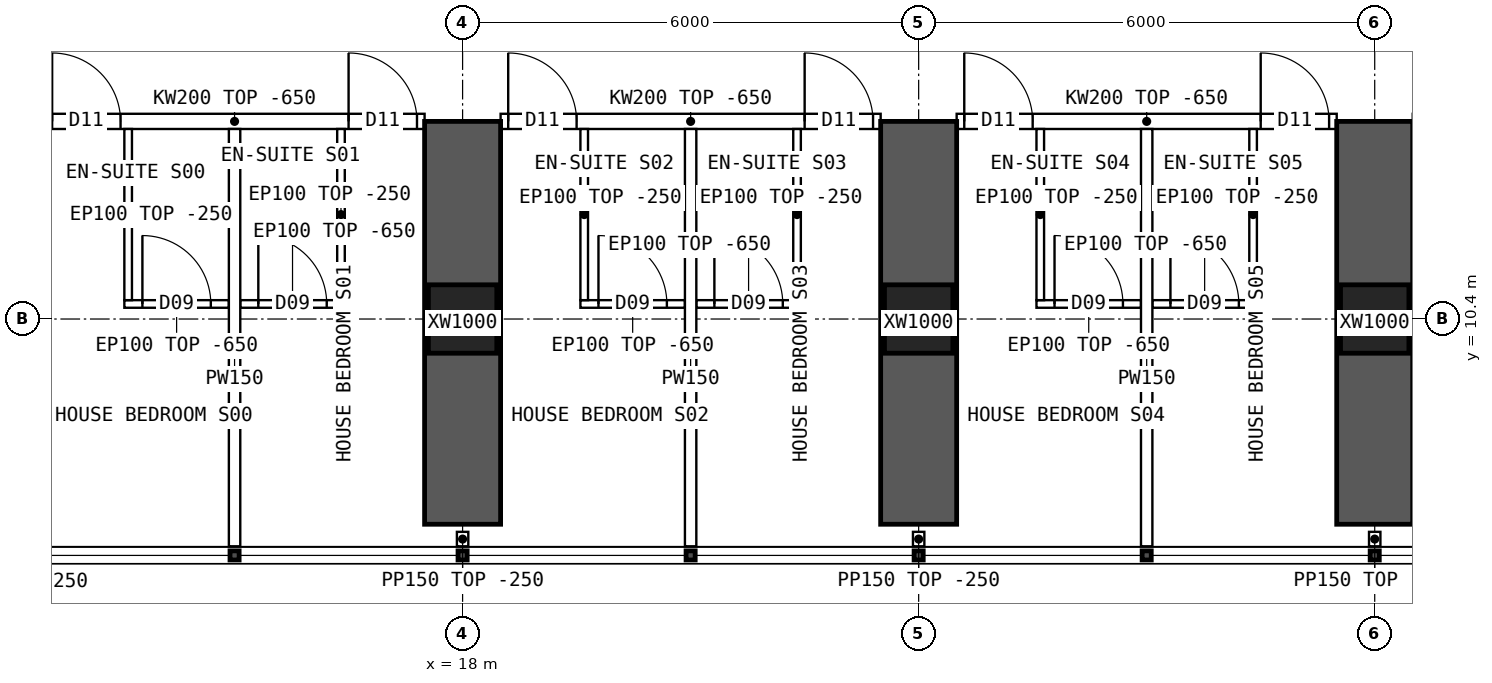
"""IFC4 building model, lengths in metres.
Left out: names, types, materials, properties, quantities, classifications, styles, units other than length and angle.
Written with IfcOpenShell. Run it as: python <this file> out.ifc"""

import sys

from ifc_helpers import new_model, si_unit, direction, frame, frame_2d, origin, origin_2d, place, context, subcontext, project, spatial, polyline, rectangle, hollow_rectangle, outline, extrude, element, fill, save


model = new_model("IFC4")
c1 = context("Model", 3, precision=1e-05, world=origin(), true_north=direction((0.0, 1.0)))
c2 = subcontext(c1, "Body", "Model", "MODEL_VIEW")
j1 = project(units=[si_unit("LENGTHUNIT", "METRE"), si_unit("PLANEANGLEUNIT", "RADIAN")], contexts=[c1])
p1 = place(None, origin())
s1 = spatial("IfcSite", under=j1, at=p1, CompositionType="ELEMENT")
p2 = place(p1, origin())
s2 = spatial("IfcBuilding", under=s1, at=p2, CompositionType="ELEMENT")
p3 = place(p2, frame((0.0, 0.0, 31.45)))
s3 = spatial("IfcBuildingStorey", under=s2, at=p3, CompositionType="ELEMENT", Elevation=31.45)
for number, where, z_axis, x_axis in (
    (1, (18.0, 10.4, 0.0), (0.0, 0.0, 1.0), (1.0, 0.0, 0.0)),
    (2, (24.0, 10.4, 0.0), (0.0, 0.0, 1.0), (1.0, 0.0, 0.0)),
    (3, (30.0, 10.4, 0.0), (0.0, 0.0, 1.0), (1.0, 0.0, 0.0)),
):
    element("IfcColumn", number, at=place(p3, frame(where, z_axis=z_axis, x_axis=x_axis)), inside=s3, PredefinedType="COLUMN", context=c2, shape_type="SweptSolid", body=[
        extrude(hollow_rectangle(XDim=0.9, YDim=0.9, WallThickness=0.09, at=origin_2d()), origin(), (0.0, 0.0, 1.0), 3.75),
    ])
for number, where, z_axis, x_axis in (
    (4, (18.0, 7.7, 0.0), (0.0, 0.0, 1.0), (0.0, 1.0, 0.0)),
    (5, (24.0, 7.7, 0.0), (0.0, 0.0, 1.0), (0.0, 1.0, 0.0)),
    (6, (30.0, 7.7, 0.0), (0.0, 0.0, 1.0), (0.0, 1.0, 0.0)),
):
    element("IfcWall", number, at=place(p3, frame(where, z_axis=z_axis, x_axis=x_axis)), inside=s3, PredefinedType="SHEAR", context=c2, shape_type="SweptSolid", body=[
        extrude(rectangle(XDim=5.3, YDim=1.0, at=frame_2d((2.65, 0.0))), origin(), (0.0, 0.0, 1.0), 3.75),
    ])
p4 = place(p3, frame((12.5, 13.0, 0.0), z_axis=(0.0, 0.0, 1.0), x_axis=(1.0, 0.0, 0.0)))
e7 = element("IfcWall", 7, at=p4, inside=s3, PredefinedType="SOLIDWALL", context=c2, shape_type="SweptSolid", body=[
    extrude(outline(polyline([(0.0, 0.0), (5.0, 0.0), (5.0, 3.1), (0.0, 3.1), (0.0, 0.0)])), frame((0.0, 0.1, 0.0), z_axis=(0.0, -1.0, 0.0), x_axis=(1.0, 0.0, 0.0)), (0.0, 0.0, 1.0), 0.2),
])
p5 = place(p4, frame((0.1, 0.0, 0.0)))
e8 = element("IfcOpeningElement", 8, at=p5, cuts=e7, PredefinedType="OPENING", context=c2, shape_type="SweptSolid", body=[
    extrude(rectangle(XDim=0.9, YDim=2.1, at=frame_2d((0.45, 1.05))), frame((0.0, 0.11, 0.0), z_axis=(0.0, -1.0, 0.0), x_axis=(1.0, 0.0, 0.0)), (0.0, 0.0, 1.0), 0.22),
])
p6 = place(p4, frame((4.0, 0.0, 0.0)))
e9 = element("IfcOpeningElement", 9, at=p6, cuts=e7, PredefinedType="OPENING", context=c2, shape_type="SweptSolid", body=[
    extrude(rectangle(XDim=0.9, YDim=2.1, at=frame_2d((0.45, 1.05))), frame((0.0, 0.11, 0.0), z_axis=(0.0, -1.0, 0.0), x_axis=(1.0, 0.0, 0.0)), (0.0, 0.0, 1.0), 0.22),
])
p7 = place(p3, frame((18.5, 13.0, 0.0), z_axis=(0.0, 0.0, 1.0), x_axis=(1.0, 0.0, 0.0)))
e10 = element("IfcWall", 10, at=p7, inside=s3, PredefinedType="SOLIDWALL", context=c2, shape_type="SweptSolid", body=[
    extrude(outline(polyline([(0.0, 0.0), (5.0, 0.0), (5.0, 3.1), (0.0, 3.1), (0.0, 0.0)])), frame((0.0, 0.1, 0.0), z_axis=(0.0, -1.0, 0.0), x_axis=(1.0, 0.0, 0.0)), (0.0, 0.0, 1.0), 0.2),
])
p8 = place(p7, frame((0.1, 0.0, 0.0)))
e11 = element("IfcOpeningElement", 11, at=p8, cuts=e10, PredefinedType="OPENING", context=c2, shape_type="SweptSolid", body=[
    extrude(rectangle(XDim=0.9, YDim=2.1, at=frame_2d((0.45, 1.05))), frame((0.0, 0.11, 0.0), z_axis=(0.0, -1.0, 0.0), x_axis=(1.0, 0.0, 0.0)), (0.0, 0.0, 1.0), 0.22),
])
p9 = place(p7, frame((4.0, 0.0, 0.0)))
e12 = element("IfcOpeningElement", 12, at=p9, cuts=e10, PredefinedType="OPENING", context=c2, shape_type="SweptSolid", body=[
    extrude(rectangle(XDim=0.9, YDim=2.1, at=frame_2d((0.45, 1.05))), frame((0.0, 0.11, 0.0), z_axis=(0.0, -1.0, 0.0), x_axis=(1.0, 0.0, 0.0)), (0.0, 0.0, 1.0), 0.22),
])
p10 = place(p3, frame((24.5, 13.0, 0.0), z_axis=(0.0, 0.0, 1.0), x_axis=(1.0, 0.0, 0.0)))
e13 = element("IfcWall", 13, at=p10, inside=s3, PredefinedType="SOLIDWALL", context=c2, shape_type="SweptSolid", body=[
    extrude(outline(polyline([(0.0, 0.0), (5.0, 0.0), (5.0, 3.1), (0.0, 3.1), (0.0, 0.0)])), frame((0.0, 0.1, 0.0), z_axis=(0.0, -1.0, 0.0), x_axis=(1.0, 0.0, 0.0)), (0.0, 0.0, 1.0), 0.2),
])
p11 = place(p10, frame((0.1, 0.0, 0.0)))
e14 = element("IfcOpeningElement", 14, at=p11, cuts=e13, PredefinedType="OPENING", context=c2, shape_type="SweptSolid", body=[
    extrude(rectangle(XDim=0.9, YDim=2.1, at=frame_2d((0.45, 1.05))), frame((0.0, 0.11, 0.0), z_axis=(0.0, -1.0, 0.0), x_axis=(1.0, 0.0, 0.0)), (0.0, 0.0, 1.0), 0.22),
])
p12 = place(p10, frame((4.0, 0.0, 0.0)))
e15 = element("IfcOpeningElement", 15, at=p12, cuts=e13, PredefinedType="OPENING", context=c2, shape_type="SweptSolid", body=[
    extrude(rectangle(XDim=0.9, YDim=2.1, at=frame_2d((0.45, 1.05))), frame((0.0, 0.11, 0.0), z_axis=(0.0, -1.0, 0.0), x_axis=(1.0, 0.0, 0.0)), (0.0, 0.0, 1.0), 0.22),
])
p13 = place(p3, frame((15.0, 7.41, 0.0), z_axis=(0.0, 0.0, 1.0), x_axis=(0.0, 1.0, 0.0)))
e16 = element("IfcWall", 16, at=p13, inside=s3, PredefinedType="PARTITIONING", context=c2, shape_type="SweptSolid", body=[
    extrude(outline(polyline([(0.0, 0.0), (5.49, 0.0), (5.49, 3.1), (5.442, 3.1), (5.44, 3.5), (3.192, 3.5), (3.19, 3.1), (2.792, 3.1), (2.79, 3.5), (0.0, 3.5), (0.0, 0.0)])), frame((0.0, 0.075, 0.0), z_axis=(0.0, -1.0, 0.0), x_axis=(1.0, 0.0, 0.0)), (0.0, 0.0, 1.0), 0.15),
])
p14 = place(p3, frame((14.925, 10.598, 0.0), z_axis=(0.0, 0.0, 1.0), x_axis=(-1.0, 0.0, 0.0)))
e17 = element("IfcWall", 17, at=p14, inside=s3, PredefinedType="PARTITIONING", context=c2, shape_type="SweptSolid", body=[
    extrude(outline(polyline([(0.0, 0.0), (1.375, 0.0), (1.375, 3.1), (0.0, 3.1), (0.0, 0.0)])), frame((0.0, 0.05, 0.0), z_axis=(0.0, -1.0, 0.0), x_axis=(1.0, 0.0, 0.0)), (0.0, 0.0, 1.0), 0.1),
])
p15 = place(p14, frame((0.238, 0.0, 0.0)))
e18 = element("IfcOpeningElement", 18, at=p15, cuts=e17, PredefinedType="OPENING", context=c2, shape_type="SweptSolid", body=[
    extrude(rectangle(XDim=0.9, YDim=2.1, at=frame_2d((0.45, 1.05))), frame((0.0, 0.06, 0.0), z_axis=(0.0, -1.0, 0.0), x_axis=(1.0, 0.0, 0.0)), (0.0, 0.0, 1.0), 0.12),
])
p16 = place(p3, frame((13.6, 10.648, 0.0), z_axis=(0.0, 0.0, 1.0), x_axis=(0.0, 1.0, 0.0)))
e19 = element("IfcWall", 19, at=p16, inside=s3, PredefinedType="PARTITIONING", context=c2, shape_type="SweptSolid", body=[
    extrude(outline(polyline([(0.0, 0.0), (2.252, 0.0), (2.252, 3.1), (2.204, 3.1), (2.202, 3.5), (0.0, 3.5), (0.0, 0.0)])), frame((0.0, 0.05, 0.0), z_axis=(0.0, -1.0, 0.0), x_axis=(1.0, 0.0, 0.0)), (0.0, 0.0, 1.0), 0.1),
])
p17 = place(p3, frame((16.45, 10.598, 0.0), z_axis=(0.0, 0.0, 1.0), x_axis=(-1.0, 0.0, 0.0)))
e20 = element("IfcWall", 20, at=p17, inside=s3, PredefinedType="PARTITIONING", context=c2, shape_type="SweptSolid", body=[
    extrude(outline(polyline([(0.0, 0.0), (1.375, 0.0), (1.375, 3.1), (0.0, 3.1), (0.0, 0.0)])), frame((0.0, 0.05, 0.0), z_axis=(0.0, -1.0, 0.0), x_axis=(1.0, 0.0, 0.0)), (0.0, 0.0, 1.0), 0.1),
])
p18 = place(p17, frame((0.238, 0.0, 0.0)))
e21 = element("IfcOpeningElement", 21, at=p18, cuts=e20, PredefinedType="OPENING", context=c2, shape_type="SweptSolid", body=[
    extrude(rectangle(XDim=0.9, YDim=2.1, at=frame_2d((0.45, 1.05))), frame((0.0, 0.06, 0.0), z_axis=(0.0, -1.0, 0.0), x_axis=(1.0, 0.0, 0.0)), (0.0, 0.0, 1.0), 0.12),
])
p19 = place(p3, frame((16.4, 10.648, 0.0), z_axis=(0.0, 0.0, 1.0), x_axis=(0.0, 1.0, 0.0)))
e22 = element("IfcWall", 22, at=p19, inside=s3, PredefinedType="PARTITIONING", context=c2, shape_type="SweptSolid", body=[
    extrude(outline(polyline([(0.0, 0.0), (2.252, 0.0), (2.252, 3.1), (2.204, 3.1), (2.202, 3.5), (0.0, 3.5), (0.0, 0.0)])), frame((0.0, 0.05, 0.0), z_axis=(0.0, -1.0, 0.0), x_axis=(1.0, 0.0, 0.0)), (0.0, 0.0, 1.0), 0.1),
])
p20 = place(p3, frame((21.0, 7.41, 0.0), z_axis=(0.0, 0.0, 1.0), x_axis=(0.0, 1.0, 0.0)))
e23 = element("IfcWall", 23, at=p20, inside=s3, PredefinedType="PARTITIONING", context=c2, shape_type="SweptSolid", body=[
    extrude(outline(polyline([(0.0, 0.0), (5.49, 0.0), (5.49, 3.1), (5.442, 3.1), (5.44, 3.5), (3.192, 3.5), (3.19, 3.1), (2.792, 3.1), (2.79, 3.5), (0.0, 3.5), (0.0, 0.0)])), frame((0.0, 0.075, 0.0), z_axis=(0.0, -1.0, 0.0), x_axis=(1.0, 0.0, 0.0)), (0.0, 0.0, 1.0), 0.15),
])
p21 = place(p3, frame((20.925, 10.598, 0.0), z_axis=(0.0, 0.0, 1.0), x_axis=(-1.0, 0.0, 0.0)))
e24 = element("IfcWall", 24, at=p21, inside=s3, PredefinedType="PARTITIONING", context=c2, shape_type="SweptSolid", body=[
    extrude(outline(polyline([(0.0, 0.0), (1.375, 0.0), (1.375, 3.1), (0.0, 3.1), (0.0, 0.0)])), frame((0.0, 0.05, 0.0), z_axis=(0.0, -1.0, 0.0), x_axis=(1.0, 0.0, 0.0)), (0.0, 0.0, 1.0), 0.1),
])
p22 = place(p21, frame((0.238, 0.0, 0.0)))
e25 = element("IfcOpeningElement", 25, at=p22, cuts=e24, PredefinedType="OPENING", context=c2, shape_type="SweptSolid", body=[
    extrude(rectangle(XDim=0.9, YDim=2.1, at=frame_2d((0.45, 1.05))), frame((0.0, 0.06, 0.0), z_axis=(0.0, -1.0, 0.0), x_axis=(1.0, 0.0, 0.0)), (0.0, 0.0, 1.0), 0.12),
])
p23 = place(p3, frame((19.6, 10.648, 0.0), z_axis=(0.0, 0.0, 1.0), x_axis=(0.0, 1.0, 0.0)))
e26 = element("IfcWall", 26, at=p23, inside=s3, PredefinedType="PARTITIONING", context=c2, shape_type="SweptSolid", body=[
    extrude(outline(polyline([(0.0, 0.0), (2.252, 0.0), (2.252, 3.1), (2.204, 3.1), (2.202, 3.5), (0.0, 3.5), (0.0, 0.0)])), frame((0.0, 0.05, 0.0), z_axis=(0.0, -1.0, 0.0), x_axis=(1.0, 0.0, 0.0)), (0.0, 0.0, 1.0), 0.1),
])
p24 = place(p3, frame((22.45, 10.598, 0.0), z_axis=(0.0, 0.0, 1.0), x_axis=(-1.0, 0.0, 0.0)))
e27 = element("IfcWall", 27, at=p24, inside=s3, PredefinedType="PARTITIONING", context=c2, shape_type="SweptSolid", body=[
    extrude(outline(polyline([(0.0, 0.0), (1.375, 0.0), (1.375, 3.1), (0.0, 3.1), (0.0, 0.0)])), frame((0.0, 0.05, 0.0), z_axis=(0.0, -1.0, 0.0), x_axis=(1.0, 0.0, 0.0)), (0.0, 0.0, 1.0), 0.1),
])
p25 = place(p24, frame((0.238, 0.0, 0.0)))
e28 = element("IfcOpeningElement", 28, at=p25, cuts=e27, PredefinedType="OPENING", context=c2, shape_type="SweptSolid", body=[
    extrude(rectangle(XDim=0.9, YDim=2.1, at=frame_2d((0.45, 1.05))), frame((0.0, 0.06, 0.0), z_axis=(0.0, -1.0, 0.0), x_axis=(1.0, 0.0, 0.0)), (0.0, 0.0, 1.0), 0.12),
])
p26 = place(p3, frame((22.4, 10.648, 0.0), z_axis=(0.0, 0.0, 1.0), x_axis=(0.0, 1.0, 0.0)))
e29 = element("IfcWall", 29, at=p26, inside=s3, PredefinedType="PARTITIONING", context=c2, shape_type="SweptSolid", body=[
    extrude(outline(polyline([(0.0, 0.0), (2.252, 0.0), (2.252, 3.1), (2.204, 3.1), (2.202, 3.5), (0.0, 3.5), (0.0, 0.0)])), frame((0.0, 0.05, 0.0), z_axis=(0.0, -1.0, 0.0), x_axis=(1.0, 0.0, 0.0)), (0.0, 0.0, 1.0), 0.1),
])
p27 = place(p3, frame((27.0, 7.41, 0.0), z_axis=(0.0, 0.0, 1.0), x_axis=(0.0, 1.0, 0.0)))
e30 = element("IfcWall", 30, at=p27, inside=s3, PredefinedType="PARTITIONING", context=c2, shape_type="SweptSolid", body=[
    extrude(outline(polyline([(0.0, 0.0), (5.49, 0.0), (5.49, 3.1), (5.442, 3.1), (5.44, 3.5), (3.192, 3.5), (3.19, 3.1), (2.792, 3.1), (2.79, 3.5), (0.0, 3.5), (0.0, 0.0)])), frame((0.0, 0.075, 0.0), z_axis=(0.0, -1.0, 0.0), x_axis=(1.0, 0.0, 0.0)), (0.0, 0.0, 1.0), 0.15),
])
p28 = place(p3, frame((26.925, 10.598, 0.0), z_axis=(0.0, 0.0, 1.0), x_axis=(-1.0, 0.0, 0.0)))
e31 = element("IfcWall", 31, at=p28, inside=s3, PredefinedType="PARTITIONING", context=c2, shape_type="SweptSolid", body=[
    extrude(outline(polyline([(0.0, 0.0), (1.375, 0.0), (1.375, 3.1), (0.0, 3.1), (0.0, 0.0)])), frame((0.0, 0.05, 0.0), z_axis=(0.0, -1.0, 0.0), x_axis=(1.0, 0.0, 0.0)), (0.0, 0.0, 1.0), 0.1),
])
p29 = place(p28, frame((0.238, 0.0, 0.0)))
e32 = element("IfcOpeningElement", 32, at=p29, cuts=e31, PredefinedType="OPENING", context=c2, shape_type="SweptSolid", body=[
    extrude(rectangle(XDim=0.9, YDim=2.1, at=frame_2d((0.45, 1.05))), frame((0.0, 0.06, 0.0), z_axis=(0.0, -1.0, 0.0), x_axis=(1.0, 0.0, 0.0)), (0.0, 0.0, 1.0), 0.12),
])
p30 = place(p3, frame((25.6, 10.648, 0.0), z_axis=(0.0, 0.0, 1.0), x_axis=(0.0, 1.0, 0.0)))
e33 = element("IfcWall", 33, at=p30, inside=s3, PredefinedType="PARTITIONING", context=c2, shape_type="SweptSolid", body=[
    extrude(outline(polyline([(0.0, 0.0), (2.252, 0.0), (2.252, 3.1), (2.204, 3.1), (2.202, 3.5), (0.0, 3.5), (0.0, 0.0)])), frame((0.0, 0.05, 0.0), z_axis=(0.0, -1.0, 0.0), x_axis=(1.0, 0.0, 0.0)), (0.0, 0.0, 1.0), 0.1),
])
p31 = place(p3, frame((28.45, 10.598, 0.0), z_axis=(0.0, 0.0, 1.0), x_axis=(-1.0, 0.0, 0.0)))
e34 = element("IfcWall", 34, at=p31, inside=s3, PredefinedType="PARTITIONING", context=c2, shape_type="SweptSolid", body=[
    extrude(outline(polyline([(0.0, 0.0), (1.375, 0.0), (1.375, 3.1), (0.0, 3.1), (0.0, 0.0)])), frame((0.0, 0.05, 0.0), z_axis=(0.0, -1.0, 0.0), x_axis=(1.0, 0.0, 0.0)), (0.0, 0.0, 1.0), 0.1),
])
p32 = place(p31, frame((0.238, 0.0, 0.0)))
e35 = element("IfcOpeningElement", 35, at=p32, cuts=e34, PredefinedType="OPENING", context=c2, shape_type="SweptSolid", body=[
    extrude(rectangle(XDim=0.9, YDim=2.1, at=frame_2d((0.45, 1.05))), frame((0.0, 0.06, 0.0), z_axis=(0.0, -1.0, 0.0), x_axis=(1.0, 0.0, 0.0)), (0.0, 0.0, 1.0), 0.12),
])
p33 = place(p3, frame((28.4, 10.648, 0.0), z_axis=(0.0, 0.0, 1.0), x_axis=(0.0, 1.0, 0.0)))
e36 = element("IfcWall", 36, at=p33, inside=s3, PredefinedType="PARTITIONING", context=c2, shape_type="SweptSolid", body=[
    extrude(outline(polyline([(0.0, 0.0), (2.252, 0.0), (2.252, 3.1), (2.204, 3.1), (2.202, 3.5), (0.0, 3.5), (0.0, 0.0)])), frame((0.0, 0.05, 0.0), z_axis=(0.0, -1.0, 0.0), x_axis=(1.0, 0.0, 0.0)), (0.0, 0.0, 1.0), 0.1),
])
for number, where, z_axis, x_axis in (
    (37, (18.0, 7.6, 0.0), (0.0, 0.0, 1.0), (0.0, -1.0, 0.0)),
    (38, (24.0, 7.6, 0.0), (0.0, 0.0, 1.0), (0.0, -1.0, 0.0)),
    (39, (30.0, 7.6, 0.0), (0.0, 0.0, 1.0), (0.0, -1.0, 0.0)),
):
    element("IfcWall", number, at=place(p3, frame(where, z_axis=z_axis, x_axis=x_axis)), inside=s3, PredefinedType="PARTITIONING", context=c2, shape_type="SweptSolid", body=[
        extrude(rectangle(XDim=0.19, YDim=0.15, at=frame_2d((0.095, 0.0))), origin(), (0.0, 0.0, 1.0), 3.5),
    ])
p34 = place(p15, origin())
e40 = element("IfcDoor", 40, at=p34, inside=s3, OperationType="SINGLE_SWING_RIGHT", PredefinedType="DOOR", context=c2, shape_type="SweptSolid", body=[
    extrude(rectangle(XDim=0.9, YDim=2.1, at=frame_2d((0.45, 1.05))), frame((0.0, 0.025, 0.0), z_axis=(0.0, -1.0, 0.0), x_axis=(1.0, 0.0, 0.0)), (0.0, 0.0, 1.0), 0.05),
])
fill(e18, e40)
p35 = place(p5, origin())
e41 = element("IfcDoor", 41, at=p35, inside=s3, OperationType="SINGLE_SWING_LEFT", PredefinedType="DOOR", context=c2, shape_type="SweptSolid", body=[
    extrude(rectangle(XDim=0.9, YDim=2.1, at=frame_2d((0.45, 1.05))), frame((0.0, 0.025, 0.0), z_axis=(0.0, -1.0, 0.0), x_axis=(1.0, 0.0, 0.0)), (0.0, 0.0, 1.0), 0.05),
])
fill(e8, e41)
p36 = place(p18, origin())
e42 = element("IfcDoor", 42, at=p36, inside=s3, OperationType="SINGLE_SWING_RIGHT", PredefinedType="DOOR", context=c2, shape_type="SweptSolid", body=[
    extrude(rectangle(XDim=0.9, YDim=2.1, at=frame_2d((0.45, 1.05))), frame((0.0, 0.025, 0.0), z_axis=(0.0, -1.0, 0.0), x_axis=(1.0, 0.0, 0.0)), (0.0, 0.0, 1.0), 0.05),
])
fill(e21, e42)
p37 = place(p6, origin())
e43 = element("IfcDoor", 43, at=p37, inside=s3, OperationType="SINGLE_SWING_LEFT", PredefinedType="DOOR", context=c2, shape_type="SweptSolid", body=[
    extrude(rectangle(XDim=0.9, YDim=2.1, at=frame_2d((0.45, 1.05))), frame((0.0, 0.025, 0.0), z_axis=(0.0, -1.0, 0.0), x_axis=(1.0, 0.0, 0.0)), (0.0, 0.0, 1.0), 0.05),
])
fill(e9, e43)
p38 = place(p22, origin())
e44 = element("IfcDoor", 44, at=p38, inside=s3, OperationType="SINGLE_SWING_RIGHT", PredefinedType="DOOR", context=c2, shape_type="SweptSolid", body=[
    extrude(rectangle(XDim=0.9, YDim=2.1, at=frame_2d((0.45, 1.05))), frame((0.0, 0.025, 0.0), z_axis=(0.0, -1.0, 0.0), x_axis=(1.0, 0.0, 0.0)), (0.0, 0.0, 1.0), 0.05),
])
fill(e25, e44)
p39 = place(p8, origin())
e45 = element("IfcDoor", 45, at=p39, inside=s3, OperationType="SINGLE_SWING_LEFT", PredefinedType="DOOR", context=c2, shape_type="SweptSolid", body=[
    extrude(rectangle(XDim=0.9, YDim=2.1, at=frame_2d((0.45, 1.05))), frame((0.0, 0.025, 0.0), z_axis=(0.0, -1.0, 0.0), x_axis=(1.0, 0.0, 0.0)), (0.0, 0.0, 1.0), 0.05),
])
fill(e11, e45)
p40 = place(p25, origin())
e46 = element("IfcDoor", 46, at=p40, inside=s3, OperationType="SINGLE_SWING_RIGHT", PredefinedType="DOOR", context=c2, shape_type="SweptSolid", body=[
    extrude(rectangle(XDim=0.9, YDim=2.1, at=frame_2d((0.45, 1.05))), frame((0.0, 0.025, 0.0), z_axis=(0.0, -1.0, 0.0), x_axis=(1.0, 0.0, 0.0)), (0.0, 0.0, 1.0), 0.05),
])
fill(e28, e46)
p41 = place(p9, origin())
e47 = element("IfcDoor", 47, at=p41, inside=s3, OperationType="SINGLE_SWING_LEFT", PredefinedType="DOOR", context=c2, shape_type="SweptSolid", body=[
    extrude(rectangle(XDim=0.9, YDim=2.1, at=frame_2d((0.45, 1.05))), frame((0.0, 0.025, 0.0), z_axis=(0.0, -1.0, 0.0), x_axis=(1.0, 0.0, 0.0)), (0.0, 0.0, 1.0), 0.05),
])
fill(e12, e47)
p42 = place(p29, origin())
e48 = element("IfcDoor", 48, at=p42, inside=s3, OperationType="SINGLE_SWING_RIGHT", PredefinedType="DOOR", context=c2, shape_type="SweptSolid", body=[
    extrude(rectangle(XDim=0.9, YDim=2.1, at=frame_2d((0.45, 1.05))), frame((0.0, 0.025, 0.0), z_axis=(0.0, -1.0, 0.0), x_axis=(1.0, 0.0, 0.0)), (0.0, 0.0, 1.0), 0.05),
])
fill(e32, e48)
p43 = place(p11, origin())
e49 = element("IfcDoor", 49, at=p43, inside=s3, OperationType="SINGLE_SWING_LEFT", PredefinedType="DOOR", context=c2, shape_type="SweptSolid", body=[
    extrude(rectangle(XDim=0.9, YDim=2.1, at=frame_2d((0.45, 1.05))), frame((0.0, 0.025, 0.0), z_axis=(0.0, -1.0, 0.0), x_axis=(1.0, 0.0, 0.0)), (0.0, 0.0, 1.0), 0.05),
])
fill(e14, e49)
p44 = place(p32, origin())
e50 = element("IfcDoor", 50, at=p44, inside=s3, OperationType="SINGLE_SWING_RIGHT", PredefinedType="DOOR", context=c2, shape_type="SweptSolid", body=[
    extrude(rectangle(XDim=0.9, YDim=2.1, at=frame_2d((0.45, 1.05))), frame((0.0, 0.025, 0.0), z_axis=(0.0, -1.0, 0.0), x_axis=(1.0, 0.0, 0.0)), (0.0, 0.0, 1.0), 0.05),
])
fill(e35, e50)
p45 = place(p12, origin())
e51 = element("IfcDoor", 51, at=p45, inside=s3, OperationType="SINGLE_SWING_LEFT", PredefinedType="DOOR", context=c2, shape_type="SweptSolid", body=[
    extrude(rectangle(XDim=0.9, YDim=2.1, at=frame_2d((0.45, 1.05))), frame((0.0, 0.025, 0.0), z_axis=(0.0, -1.0, 0.0), x_axis=(1.0, 0.0, 0.0)), (0.0, 0.0, 1.0), 0.05),
])
fill(e15, e51)
save(model, sys.argv[1])
